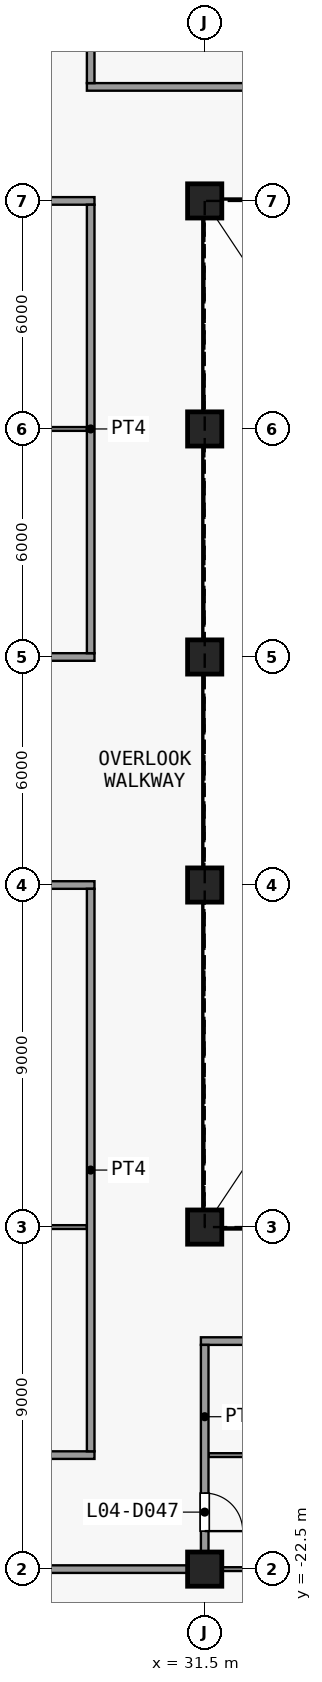
"""IFC4 building model, lengths in metres.
Left out: names, types, materials, properties, quantities, classifications, styles, units other than length and angle.
Written with IfcOpenShell. Run it as: python <this file> out.ifc"""

import sys

from ifc_helpers import new_model, si_unit, direction, frame, frame_2d, origin, origin_2d, place, context, subcontext, project, spatial, rectangle, extrude, element, fill, save


model = new_model("IFC4")
c1 = context("Model", 3, precision=1e-05, world=origin(), true_north=direction((0.0, 1.0)))
c2 = subcontext(c1, "Body", "Model", "MODEL_VIEW")
j1 = project(units=[si_unit("LENGTHUNIT", "METRE"), si_unit("PLANEANGLEUNIT", "RADIAN")], contexts=[c1])
p1 = place(None, origin())
s1 = spatial("IfcSite", under=j1, at=p1, CompositionType="ELEMENT")
p2 = place(p1, origin())
s2 = spatial("IfcBuilding", under=s1, at=p2, CompositionType="ELEMENT")
p3 = place(p2, frame((0.0, 0.0, 23.5)))
s3 = spatial("IfcBuildingStorey", under=s2, at=p3, CompositionType="ELEMENT", Elevation=23.5)
for number, where, z_axis, x_axis in (
    (1, (31.5, -22.5, 0.0), (0.0, 0.0, 1.0), (1.0, 0.0, 0.0)),
    (2, (31.5, -13.5, 0.0), (0.0, 0.0, 1.0), (1.0, 0.0, 0.0)),
    (3, (31.5, -4.5, 0.0), (0.0, 0.0, 1.0), (1.0, 0.0, 0.0)),
    (4, (31.5, 1.5, 0.0), (0.0, 0.0, 1.0), (1.0, 0.0, 0.0)),
    (5, (31.5, 7.5, 0.0), (0.0, 0.0, 1.0), (1.0, 0.0, 0.0)),
    (6, (31.5, 13.5, 0.0), (0.0, 0.0, 1.0), (1.0, 0.0, 0.0)),
):
    element("IfcColumn", number, at=place(p3, frame(where, z_axis=z_axis, x_axis=x_axis)), inside=s3, PredefinedType="COLUMN", context=c2, shape_type="SweptSolid", body=[
        extrude(rectangle(XDim=0.9, YDim=0.9, at=origin_2d()), origin(), (0.0, 0.0, 1.0), 4.5),
    ])
p4 = place(p3, frame((17.4, -22.5, 0.0), z_axis=(0.0, 0.0, 1.0), x_axis=(1.0, 0.0, 0.0)))
e7 = element("IfcWall", 7, at=p4, inside=s3, PredefinedType="PARTITIONING", context=c2, shape_type="SweptSolid", body=[
    extrude(rectangle(XDim=14.1, YDim=0.2, at=frame_2d((7.05, 0.0))), origin(), (0.0, 0.0, 1.0), 4.15),
])
p5 = place(p3, frame((31.5, -22.5, 0.0), z_axis=(0.0, 0.0, 1.0), x_axis=(1.0, 0.0, 0.0)))
e8 = element("IfcWall", 8, at=p5, inside=s3, PredefinedType="PARTITIONING", context=c2, shape_type="SweptSolid", body=[
    extrude(rectangle(XDim=20.95, YDim=0.1, at=frame_2d((10.475, 0.0))), origin(), (0.0, 0.0, 1.0), 4.15),
])
p6 = place(p3, frame((13.5, -19.5, 0.0), z_axis=(0.0, 0.0, 1.0), x_axis=(1.0, 0.0, 0.0)))
e9 = element("IfcWall", 9, at=p6, inside=s3, PredefinedType="PARTITIONING", context=c2, shape_type="SweptSolid", body=[
    extrude(rectangle(XDim=15.1, YDim=0.2, at=frame_2d((7.55, 0.0))), origin(), (0.0, 0.0, 1.0), 4.15),
])
p7 = place(p6, frame((7.0, 0.0, 0.0)))
e10 = element("IfcOpeningElement", 10, at=p7, cuts=e9, PredefinedType="OPENING", context=c2, shape_type="SweptSolid", body=[
    extrude(rectangle(XDim=1.0, YDim=2.1, at=frame_2d((0.5, 1.05))), frame((0.0, 0.11, 0.0), z_axis=(0.0, -1.0, 0.0), x_axis=(1.0, 0.0, 0.0)), (0.0, 0.0, 1.0), 0.22),
])
p8 = place(p3, frame((31.6, -19.5, 0.0), z_axis=(0.0, 0.0, 1.0), x_axis=(1.0, 0.0, 0.0)))
e11 = element("IfcWall", 11, at=p8, inside=s3, PredefinedType="PARTITIONING", context=c2, shape_type="SweptSolid", body=[
    extrude(rectangle(XDim=20.85, YDim=0.1, at=frame_2d((10.425, 0.0))), origin(), (0.0, 0.0, 1.0), 4.15),
])
p9 = place(p3, frame((31.4, -16.5, 0.0), z_axis=(0.0, 0.0, 1.0), x_axis=(1.0, 0.0, 0.0)))
e12 = element("IfcWall", 12, at=p9, inside=s3, PredefinedType="PARTITIONING", context=c2, shape_type="SweptSolid", body=[
    extrude(rectangle(XDim=21.0, YDim=0.2, at=frame_2d((10.5, 0.0))), origin(), (0.0, 0.0, 1.0), 4.15),
])
p10 = place(p9, frame((3.2, 0.0, 0.0)))
e13 = element("IfcOpeningElement", 13, at=p10, cuts=e12, PredefinedType="OPENING", context=c2, shape_type="SweptSolid", body=[
    extrude(rectangle(XDim=1.0, YDim=2.1, at=frame_2d((0.5, 1.05))), frame((0.0, 0.11, 0.0), z_axis=(0.0, -1.0, 0.0), x_axis=(1.0, 0.0, 0.0)), (0.0, 0.0, 1.0), 0.22),
])
p11 = place(p9, frame((14.0, 0.0, 0.0)))
e14 = element("IfcOpeningElement", 14, at=p11, cuts=e12, PredefinedType="OPENING", context=c2, shape_type="SweptSolid", body=[
    extrude(rectangle(XDim=1.0, YDim=2.1, at=frame_2d((0.5, 1.05))), frame((0.0, 0.11, 0.0), z_axis=(0.0, -1.0, 0.0), x_axis=(1.0, 0.0, 0.0)), (0.0, 0.0, 1.0), 0.22),
])
p12 = place(p3, frame((13.5, -13.5, 0.0), z_axis=(0.0, 0.0, 1.0), x_axis=(1.0, 0.0, 0.0)))
e15 = element("IfcWall", 15, at=p12, inside=s3, PredefinedType="PARTITIONING", context=c2, shape_type="SweptSolid", body=[
    extrude(rectangle(XDim=14.9, YDim=0.1, at=frame_2d((7.45, 0.0))), origin(), (0.0, 0.0, 1.0), 4.15),
])
p13 = place(p3, frame((13.4, -4.5, 0.0), z_axis=(0.0, 0.0, 1.0), x_axis=(1.0, 0.0, 0.0)))
e16 = element("IfcWall", 16, at=p13, inside=s3, PredefinedType="PARTITIONING", context=c2, shape_type="SweptSolid", body=[
    extrude(rectangle(XDim=15.2, YDim=0.2, at=frame_2d((7.6, 0.0))), origin(), (0.0, 0.0, 1.0), 4.15),
])
p14 = place(p13, frame((4.0, 0.0, 0.0)))
e17 = element("IfcOpeningElement", 17, at=p14, cuts=e16, PredefinedType="OPENING", context=c2, shape_type="SweptSolid", body=[
    extrude(rectangle(XDim=1.8, YDim=2.1, at=frame_2d((0.9, 1.05))), frame((0.0, 0.11, 0.0), z_axis=(0.0, -1.0, 0.0), x_axis=(1.0, 0.0, 0.0)), (0.0, 0.0, 1.0), 0.22),
])
p15 = place(p13, frame((11.2, 0.0, 0.0)))
e18 = element("IfcOpeningElement", 18, at=p15, cuts=e16, PredefinedType="OPENING", context=c2, shape_type="SweptSolid", body=[
    extrude(rectangle(XDim=1.8, YDim=2.1, at=frame_2d((0.9, 1.05))), frame((0.0, 0.11, 0.0), z_axis=(0.0, -1.0, 0.0), x_axis=(1.0, 0.0, 0.0)), (0.0, 0.0, 1.0), 0.22),
])
p16 = place(p3, frame((20.3, 1.5, 0.0), z_axis=(0.0, 0.0, 1.0), x_axis=(1.0, 0.0, 0.0)))
e19 = element("IfcWall", 19, at=p16, inside=s3, PredefinedType="PARTITIONING", context=c2, shape_type="SweptSolid", body=[
    extrude(rectangle(XDim=8.3, YDim=0.2, at=frame_2d((4.15, 0.0))), origin(), (0.0, 0.0, 1.0), 4.15),
])
p17 = place(p16, frame((3.7, 0.0, 0.0)))
e20 = element("IfcOpeningElement", 20, at=p17, cuts=e19, PredefinedType="OPENING", context=c2, shape_type="SweptSolid", body=[
    extrude(rectangle(XDim=1.0, YDim=2.1, at=frame_2d((0.5, 1.05))), frame((0.0, 0.11, 0.0), z_axis=(0.0, -1.0, 0.0), x_axis=(1.0, 0.0, 0.0)), (0.0, 0.0, 1.0), 0.22),
])
p18 = place(p3, frame((20.5, 7.5, 0.0), z_axis=(0.0, 0.0, 1.0), x_axis=(1.0, 0.0, 0.0)))
e21 = element("IfcWall", 21, at=p18, inside=s3, PredefinedType="PARTITIONING", context=c2, shape_type="SweptSolid", body=[
    extrude(rectangle(XDim=7.9, YDim=0.1, at=frame_2d((3.95, 0.0))), origin(), (0.0, 0.0, 1.0), 4.15),
])
p19 = place(p3, frame((20.3, 13.5, 0.0), z_axis=(0.0, 0.0, 1.0), x_axis=(1.0, 0.0, 0.0)))
e22 = element("IfcWall", 22, at=p19, inside=s3, PredefinedType="PARTITIONING", context=c2, shape_type="SweptSolid", body=[
    extrude(rectangle(XDim=8.3, YDim=0.2, at=frame_2d((4.15, 0.0))), origin(), (0.0, 0.0, 1.0), 4.15),
])
p20 = place(p19, frame((3.7, 0.0, 0.0)))
e23 = element("IfcOpeningElement", 23, at=p20, cuts=e22, PredefinedType="OPENING", context=c2, shape_type="SweptSolid", body=[
    extrude(rectangle(XDim=1.0, YDim=2.1, at=frame_2d((0.5, 1.05))), frame((0.0, 0.11, 0.0), z_axis=(0.0, -1.0, 0.0), x_axis=(1.0, 0.0, 0.0)), (0.0, 0.0, 1.0), 0.22),
])
p21 = place(p3, frame((28.4, 16.5, 0.0), z_axis=(0.0, 0.0, 1.0), x_axis=(1.0, 0.0, 0.0)))
e24 = element("IfcWall", 24, at=p21, inside=s3, PredefinedType="PARTITIONING", context=c2, shape_type="SweptSolid", body=[
    extrude(rectangle(XDim=24.2, YDim=0.2, at=frame_2d((12.1, 0.0))), origin(), (0.0, 0.0, 1.0), 4.15),
])
p22 = place(p21, frame((6.2, 0.0, 0.0)))
e25 = element("IfcOpeningElement", 25, at=p22, cuts=e24, PredefinedType="OPENING", context=c2, shape_type="SweptSolid", body=[
    extrude(rectangle(XDim=1.0, YDim=2.1, at=frame_2d((0.5, 1.05))), frame((0.0, 0.11, 0.0), z_axis=(0.0, -1.0, 0.0), x_axis=(1.0, 0.0, 0.0)), (0.0, 0.0, 1.0), 0.22),
])
p23 = place(p21, frame((17.0, 0.0, 0.0)))
e26 = element("IfcOpeningElement", 26, at=p23, cuts=e24, PredefinedType="OPENING", context=c2, shape_type="SweptSolid", body=[
    extrude(rectangle(XDim=1.0, YDim=2.1, at=frame_2d((0.5, 1.05))), frame((0.0, 0.11, 0.0), z_axis=(0.0, -1.0, 0.0), x_axis=(1.0, 0.0, 0.0)), (0.0, 0.0, 1.0), 0.22),
])
p24 = place(p3, frame((28.5, -19.4, 0.0), z_axis=(0.0, 0.0, 1.0), x_axis=(0.0, 1.0, 0.0)))
e27 = element("IfcWall", 27, at=p24, inside=s3, PredefinedType="PARTITIONING", context=c2, shape_type="SweptSolid", body=[
    extrude(rectangle(XDim=14.8, YDim=0.2, at=frame_2d((7.4, 0.0))), origin(), (0.0, 0.0, 1.0), 4.15),
])
p25 = place(p3, frame((28.5, 1.6, 0.0), z_axis=(0.0, 0.0, 1.0), x_axis=(0.0, 1.0, 0.0)))
e28 = element("IfcWall", 28, at=p25, inside=s3, PredefinedType="PARTITIONING", context=c2, shape_type="SweptSolid", body=[
    extrude(rectangle(XDim=11.8, YDim=0.2, at=frame_2d((5.9, 0.0))), origin(), (0.0, 0.0, 1.0), 4.15),
])
p26 = place(p3, frame((28.5, 16.6, 0.0), z_axis=(0.0, 0.0, 1.0), x_axis=(0.0, 1.0, 0.0)))
e29 = element("IfcWall", 29, at=p26, inside=s3, PredefinedType="PARTITIONING", context=c2, shape_type="SweptSolid", body=[
    extrude(rectangle(XDim=2.8, YDim=0.2, at=frame_2d((1.4, 0.0))), origin(), (0.0, 0.0, 1.0), 4.15),
])
p27 = place(p3, frame((31.5, -22.4, 0.0), z_axis=(0.0, 0.0, 1.0), x_axis=(0.0, 1.0, 0.0)))
e30 = element("IfcWall", 30, at=p27, inside=s3, PredefinedType="PARTITIONING", context=c2, shape_type="SweptSolid", body=[
    extrude(rectangle(XDim=5.8, YDim=0.2, at=frame_2d((2.9, 0.0))), origin(), (0.0, 0.0, 1.0), 4.15),
])
p28 = place(p27, frame((0.9, 0.0, 0.0)))
e31 = element("IfcOpeningElement", 31, at=p28, cuts=e30, PredefinedType="OPENING", context=c2, shape_type="SweptSolid", body=[
    extrude(rectangle(XDim=1.0, YDim=2.1, at=frame_2d((0.5, 1.05))), frame((0.0, 0.11, 0.0), z_axis=(0.0, -1.0, 0.0), x_axis=(1.0, 0.0, 0.0)), (0.0, 0.0, 1.0), 0.22),
])
p29 = place(p28, origin())
e32 = element("IfcDoor", 32, at=p29, inside=s3, OperationType="SINGLE_SWING_LEFT", PredefinedType="DOOR", context=c2, shape_type="SweptSolid", body=[
    extrude(rectangle(XDim=1.0, YDim=2.1, at=frame_2d((0.5, 1.05))), frame((0.0, 0.025, 0.0), z_axis=(0.0, -1.0, 0.0), x_axis=(1.0, 0.0, 0.0)), (0.0, 0.0, 1.0), 0.05),
])
fill(e31, e32)
save(model, sys.argv[1])
